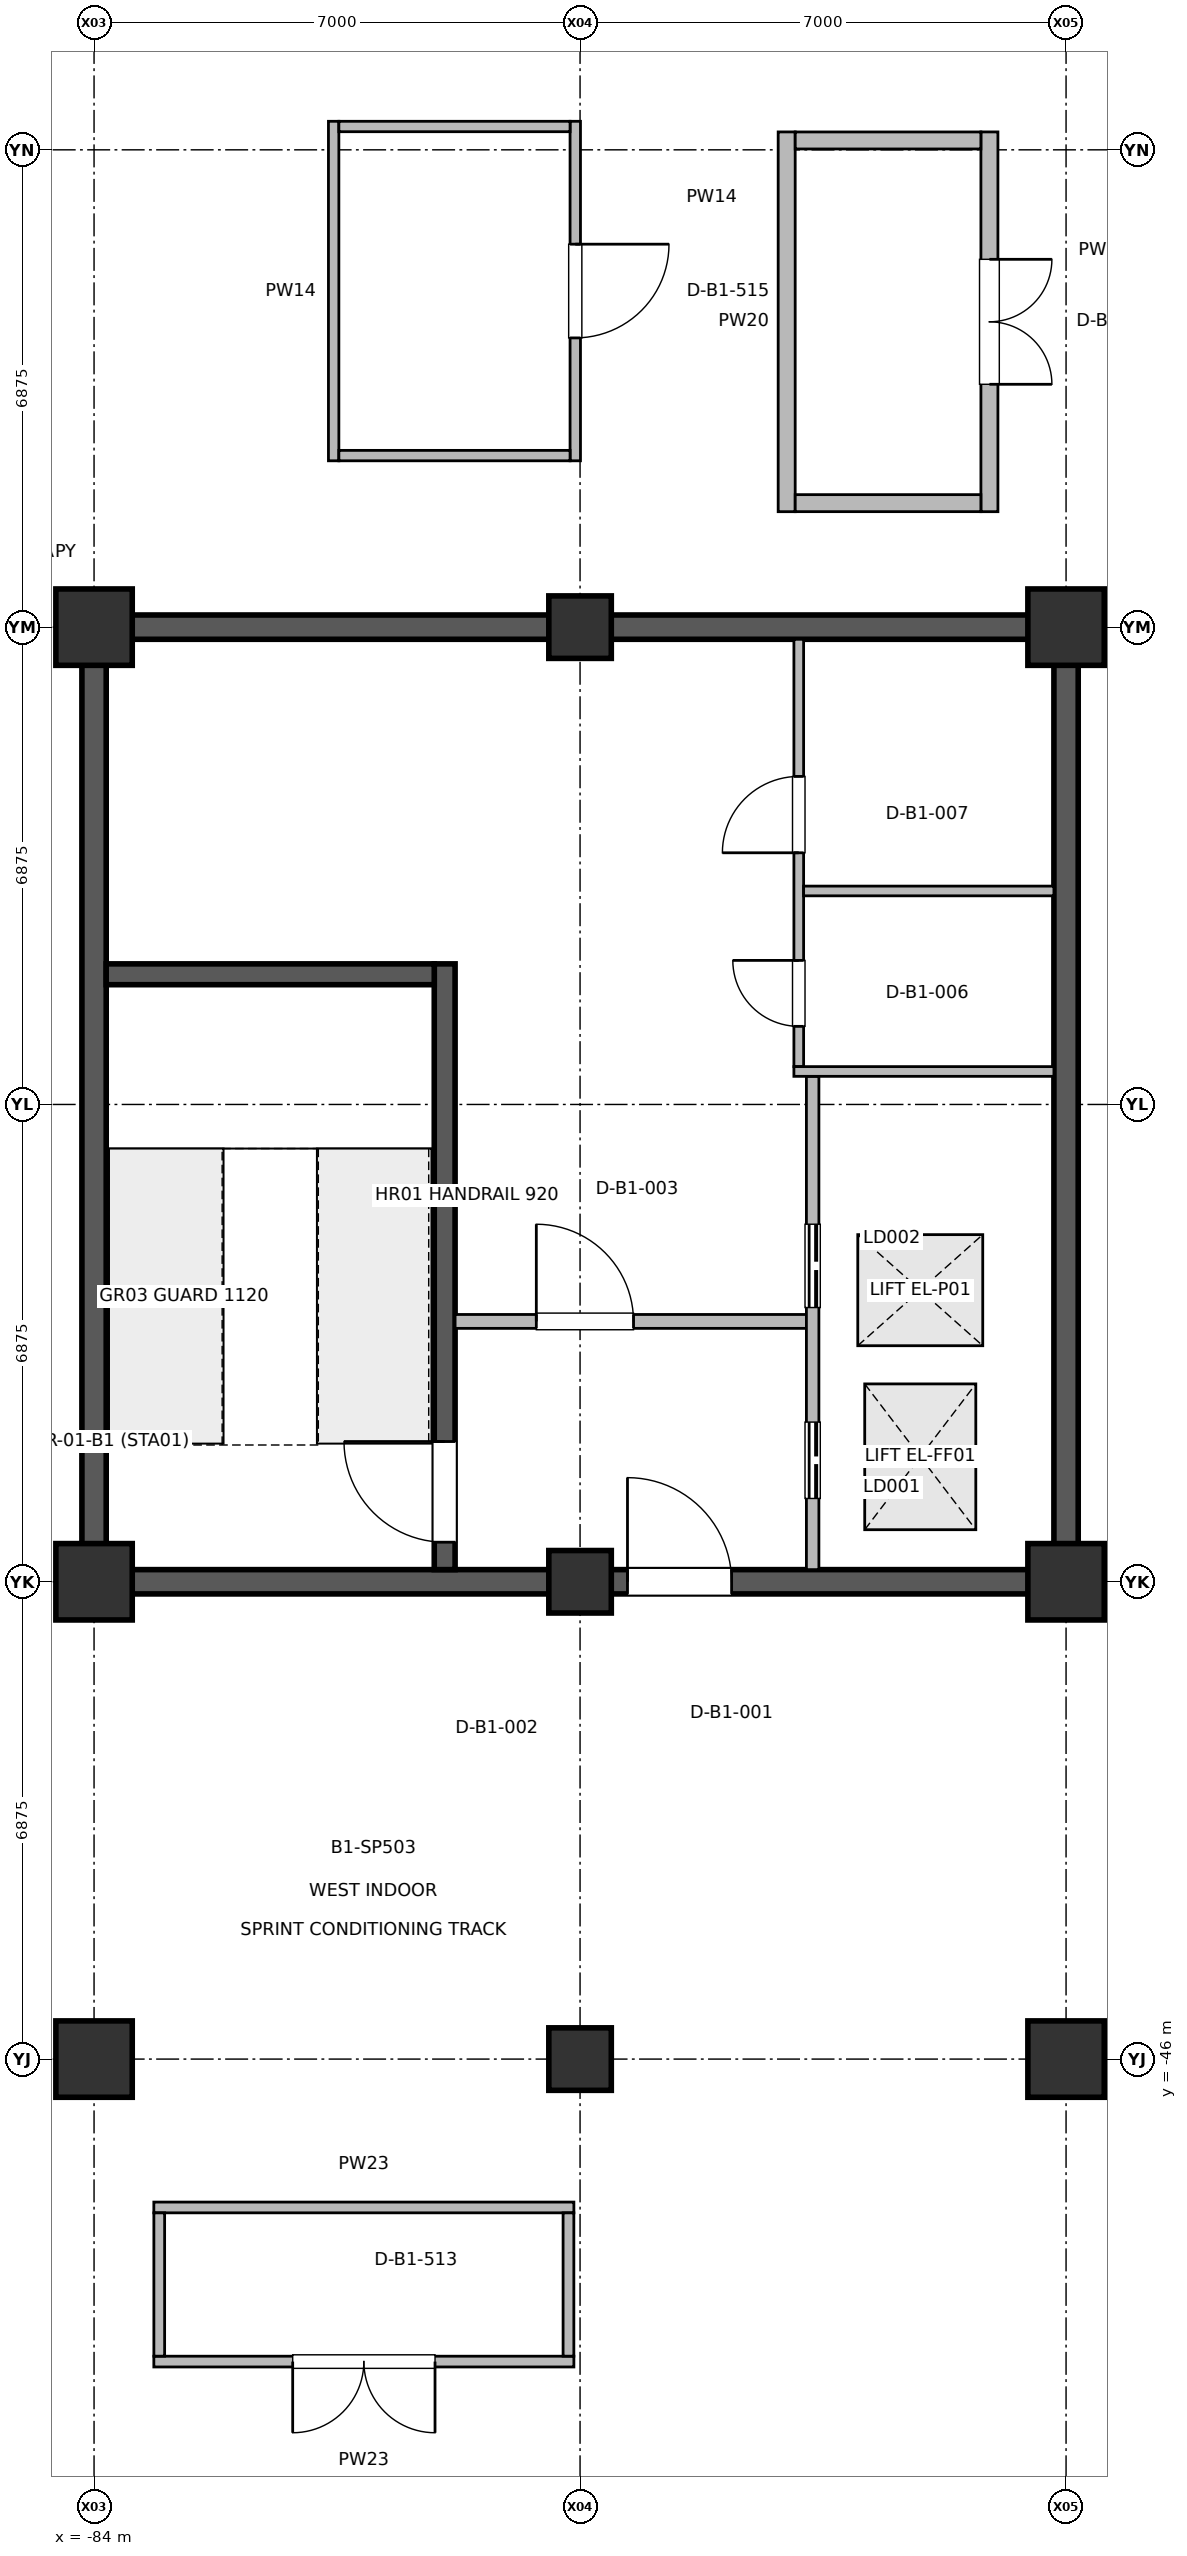
"""IFC4 building model, lengths in metres.
Left out: names, types, materials, properties, quantities, classifications, styles, units other than length and angle.
Written with IfcOpenShell. Run it as: python <this file> out.ifc"""

import sys

from ifc_helpers import new_model, si_unit, direction, frame, frame_2d, origin, origin_2d, place, context, subcontext, project, spatial, rectangle, extrude, element, fill, save


model = new_model("IFC4")
c1 = context("Model", 3, precision=1e-05, world=origin(), true_north=direction((0.0, 1.0)))
c2 = subcontext(c1, "Body", "Model", "MODEL_VIEW")
j1 = project(units=[si_unit("LENGTHUNIT", "METRE"), si_unit("PLANEANGLEUNIT", "RADIAN")], contexts=[c1])
p1 = place(None, origin())
s1 = spatial("IfcSite", under=j1, at=p1, CompositionType="ELEMENT")
p2 = place(p1, origin())
s2 = spatial("IfcBuilding", under=s1, at=p2, CompositionType="ELEMENT")
p3 = place(p2, frame((0.0, 0.0, -6.0)))
s3 = spatial("IfcBuildingStorey", under=s2, at=p3, CompositionType="ELEMENT", Elevation=-6.0)
for number, where, z_axis, x_axis in (
    (1, (-84.0, -46.0, 0.0), (0.0, 0.0, 1.0), (1.0, 0.0, 0.0)),
    (2, (-84.0, -39.125, 0.0), (0.0, 0.0, 1.0), (1.0, 0.0, 0.0)),
    (3, (-84.0, -25.375, 0.0), (0.0, 0.0, 1.0), (1.0, 0.0, 0.0)),
):
    element("IfcColumn", number, at=place(p3, frame(where, z_axis=z_axis, x_axis=x_axis)), inside=s3, PredefinedType="COLUMN", context=c2, shape_type="SweptSolid", body=[
        extrude(rectangle(XDim=1.1, YDim=1.1, at=origin_2d()), origin(), (0.0, 0.0, 1.0), 5.998),
    ])
for number, where, z_axis, x_axis in (
    (4, (-77.0, -46.0, 0.0), (0.0, 0.0, 1.0), (1.0, 0.0, 0.0)),
    (5, (-77.0, -39.125, 0.0), (0.0, 0.0, 1.0), (1.0, 0.0, 0.0)),
    (6, (-77.0, -25.375, 0.0), (0.0, 0.0, 1.0), (1.0, 0.0, 0.0)),
):
    element("IfcColumn", number, at=place(p3, frame(where, z_axis=z_axis, x_axis=x_axis)), inside=s3, PredefinedType="COLUMN", context=c2, shape_type="SweptSolid", body=[
        extrude(rectangle(XDim=0.9, YDim=0.9, at=origin_2d()), origin(), (0.0, 0.0, 1.0), 5.998),
    ])
for number, where, z_axis, x_axis in (
    (7, (-70.0, -46.0, 0.0), (0.0, 0.0, 1.0), (1.0, 0.0, 0.0)),
    (8, (-70.0, -39.125, 0.0), (0.0, 0.0, 1.0), (1.0, 0.0, 0.0)),
    (9, (-70.0, -25.375, 0.0), (0.0, 0.0, 1.0), (1.0, 0.0, 0.0)),
):
    element("IfcColumn", number, at=place(p3, frame(where, z_axis=z_axis, x_axis=x_axis)), inside=s3, PredefinedType="COLUMN", context=c2, shape_type="SweptSolid", body=[
        extrude(rectangle(XDim=1.1, YDim=1.1, at=origin_2d()), origin(), (0.0, 0.0, 1.0), 5.998),
    ])
for number, where, z_axis, x_axis in (
    (10, (-84.0, -38.95, 0.0), (0.0, 0.0, 1.0), (0.0, 1.0, 0.0)),
    (11, (-70.0, -38.95, 0.0), (0.0, 0.0, 1.0), (0.0, 1.0, 0.0)),
):
    element("IfcWall", number, at=place(p3, frame(where, z_axis=z_axis, x_axis=x_axis)), inside=s3, PredefinedType="SHEAR", context=c2, shape_type="SweptSolid", body=[
        extrude(rectangle(XDim=13.4, YDim=0.35, at=frame_2d((6.7, 0.0))), origin(), (0.0, 0.0, 1.0), 5.75),
    ])
p4 = place(p3, frame((-83.825, -39.125, 0.0), z_axis=(0.0, 0.0, 1.0), x_axis=(1.0, 0.0, 0.0)))
e12 = element("IfcWall", 12, at=p4, inside=s3, PredefinedType="SHEAR", context=c2, shape_type="SweptSolid", body=[
    extrude(rectangle(XDim=13.65, YDim=0.35, at=frame_2d((6.825, 0.0))), origin(), (0.0, 0.0, 1.0), 5.75),
])
p5 = place(p4, frame((7.508, 0.0, 0.0)))
e13 = element("IfcOpeningElement", 13, at=p5, cuts=e12, PredefinedType="OPENING", context=c2, shape_type="SweptSolid", body=[
    extrude(rectangle(XDim=1.5, YDim=2.2, at=frame_2d((0.75, 1.1))), frame((0.0, 0.185, 0.0), z_axis=(0.0, -1.0, 0.0), x_axis=(1.0, 0.0, 0.0)), (0.0, 0.0, 1.0), 0.37),
])
p6 = place(p3, frame((-83.825, -25.375, 0.0), z_axis=(0.0, 0.0, 1.0), x_axis=(1.0, 0.0, 0.0)))
e14 = element("IfcWall", 14, at=p6, inside=s3, PredefinedType="SHEAR", context=c2, shape_type="SweptSolid", body=[
    extrude(rectangle(XDim=13.65, YDim=0.35, at=frame_2d((6.825, 0.0))), origin(), (0.0, 0.0, 1.0), 5.75),
])
p7 = place(p3, frame((-78.95, -38.95, 0.0), z_axis=(0.0, 0.0, 1.0), x_axis=(0.0, 1.0, 0.0)))
e15 = element("IfcWall", 15, at=p7, inside=s3, PredefinedType="SHEAR", context=c2, shape_type="SweptSolid", body=[
    extrude(rectangle(XDim=8.725, YDim=0.3, at=frame_2d((4.362, 0.0))), origin(), (0.0, 0.0, 1.0), 5.75),
])
p8 = place(p7, frame((0.395, 0.0, 0.0)))
e16 = element("IfcOpeningElement", 16, at=p8, cuts=e15, PredefinedType="OPENING", context=c2, shape_type="SweptSolid", body=[
    extrude(rectangle(XDim=1.45, YDim=2.2, at=frame_2d((0.725, 1.1))), frame((0.0, 0.16, 0.0), z_axis=(0.0, -1.0, 0.0), x_axis=(1.0, 0.0, 0.0)), (0.0, 0.0, 1.0), 0.32),
])
p9 = place(p3, frame((-78.8, -35.375, 0.0), z_axis=(0.0, 0.0, 1.0), x_axis=(1.0, 0.0, 0.0)))
e17 = element("IfcWall", 17, at=p9, inside=s3, PredefinedType="PARTITIONING", context=c2, shape_type="SweptSolid", body=[
    extrude(rectangle(XDim=5.06, YDim=0.2, at=frame_2d((2.53, 0.0))), origin(), (0.0, 0.0, 1.0), 5.02),
])
p10 = place(p9, frame((1.17, 0.0, 0.0)))
e18 = element("IfcOpeningElement", 18, at=p10, cuts=e17, PredefinedType="OPENING", context=c2, shape_type="SweptSolid", body=[
    extrude(rectangle(XDim=1.4, YDim=2.2, at=frame_2d((0.7, 1.1))), frame((0.0, 0.11, 0.0), z_axis=(0.0, -1.0, 0.0), x_axis=(1.0, 0.0, 0.0)), (0.0, 0.0, 1.0), 0.22),
])
p11 = place(p3, frame((-73.65, -38.95, 0.0), z_axis=(0.0, 0.0, 1.0), x_axis=(0.0, 1.0, 0.0)))
e19 = element("IfcWall", 19, at=p11, inside=s3, PredefinedType="PARTITIONING", context=c2, shape_type="SweptSolid", body=[
    extrude(rectangle(XDim=7.105, YDim=0.18, at=frame_2d((3.552, 0.0))), origin(), (0.0, 0.0, 1.0), 5.02),
])
p12 = place(p11, frame((1.025, 0.0, 0.0)))
e20 = element("IfcOpeningElement", 20, at=p12, cuts=e19, PredefinedType="OPENING", context=c2, shape_type="SweptSolid", body=[
    extrude(rectangle(XDim=1.1, YDim=2.2, at=frame_2d((0.55, 1.1))), frame((0.0, 0.1, 0.0), z_axis=(0.0, -1.0, 0.0), x_axis=(1.0, 0.0, 0.0)), (0.0, 0.0, 1.0), 0.2),
])
p13 = place(p11, frame((3.775, 0.0, 0.0)))
e21 = element("IfcOpeningElement", 21, at=p13, cuts=e19, PredefinedType="OPENING", context=c2, shape_type="SweptSolid", body=[
    extrude(rectangle(XDim=1.2, YDim=2.25, at=frame_2d((0.6, 1.125))), frame((0.0, 0.1, 0.0), z_axis=(0.0, -1.0, 0.0), x_axis=(1.0, 0.0, 0.0)), (0.0, 0.0, 1.0), 0.2),
])
p14 = place(p3, frame((-73.85, -31.705, 0.0), z_axis=(0.0, 0.0, 1.0), x_axis=(0.0, 1.0, 0.0)))
e22 = element("IfcWall", 22, at=p14, inside=s3, PredefinedType="PARTITIONING", context=c2, shape_type="SweptSolid", body=[
    extrude(rectangle(XDim=6.155, YDim=0.14, at=frame_2d((3.078, 0.0))), origin(), (0.0, 0.0, 1.0), 5.02),
])
p15 = place(p14, frame((0.58, 0.0, 0.0)))
e23 = element("IfcOpeningElement", 23, at=p15, cuts=e22, PredefinedType="OPENING", context=c2, shape_type="SweptSolid", body=[
    extrude(rectangle(XDim=0.95, YDim=2.15, at=frame_2d((0.475, 1.075))), frame((0.0, 0.08, 0.0), z_axis=(0.0, -1.0, 0.0), x_axis=(1.0, 0.0, 0.0)), (0.0, 0.0, 1.0), 0.16),
])
p16 = place(p14, frame((3.08, 0.0, 0.0)))
e24 = element("IfcOpeningElement", 24, at=p16, cuts=e22, PredefinedType="OPENING", context=c2, shape_type="SweptSolid", body=[
    extrude(rectangle(XDim=1.1, YDim=2.15, at=frame_2d((0.55, 1.075))), frame((0.0, 0.08, 0.0), z_axis=(0.0, -1.0, 0.0), x_axis=(1.0, 0.0, 0.0)), (0.0, 0.0, 1.0), 0.16),
])
p17 = place(p3, frame((-71.104, -18.242, 0.0), z_axis=(0.0, 0.0, 1.0), x_axis=(0.0, -1.0, 0.0)))
e25 = element("IfcWall", 25, at=p17, inside=s3, PredefinedType="PARTITIONING", context=c2, shape_type="SweptSolid", body=[
    extrude(rectangle(XDim=5.47, YDim=0.245, at=frame_2d((2.735, 0.0))), origin(), (0.0, 0.0, 1.0), 5.02),
])
p18 = place(p17, frame((1.835, 0.0, 0.0)))
e26 = element("IfcOpeningElement", 26, at=p18, cuts=e25, PredefinedType="OPENING", context=c2, shape_type="SweptSolid", body=[
    extrude(rectangle(XDim=1.8, YDim=2.3, at=frame_2d((0.9, 1.15))), frame((0.0, 0.133, 0.0), z_axis=(0.0, -1.0, 0.0), x_axis=(1.0, 0.0, 0.0)), (0.0, 0.0, 1.0), 0.265),
])
p19 = place(p3, frame((-77.089, -50.357, 0.0), z_axis=(0.0, 0.0, 1.0), x_axis=(-1.0, 0.0, 0.0)))
e27 = element("IfcWall", 27, at=p19, inside=s3, PredefinedType="PARTITIONING", context=c2, shape_type="SweptSolid", body=[
    extrude(rectangle(XDim=6.05, YDim=0.155, at=frame_2d((3.025, 0.0))), origin(), (0.0, 0.0, 1.0), 5.02),
])
p20 = place(p19, frame((2.0, 0.0, 0.0)))
e28 = element("IfcOpeningElement", 28, at=p20, cuts=e27, PredefinedType="OPENING", context=c2, shape_type="SweptSolid", body=[
    extrude(rectangle(XDim=2.05, YDim=2.4, at=frame_2d((1.025, 1.2))), frame((0.0, 0.087, 0.0), z_axis=(0.0, -1.0, 0.0), x_axis=(1.0, 0.0, 0.0)), (0.0, 0.0, 1.0), 0.175),
])
p21 = place(p3, frame((-77.069, -18.089, 0.0), z_axis=(0.0, 0.0, 1.0), x_axis=(0.0, -1.0, 0.0)))
e29 = element("IfcWall", 29, at=p21, inside=s3, PredefinedType="PARTITIONING", context=c2, shape_type="SweptSolid", body=[
    extrude(rectangle(XDim=4.89, YDim=0.15, at=frame_2d((2.445, 0.0))), origin(), (0.0, 0.0, 1.0), 5.02),
])
p22 = place(p21, frame((1.77, 0.0, 0.0)))
e30 = element("IfcOpeningElement", 30, at=p22, cuts=e29, PredefinedType="OPENING", context=c2, shape_type="SweptSolid", body=[
    extrude(rectangle(XDim=1.35, YDim=2.2, at=frame_2d((0.675, 1.1))), frame((0.0, 0.085, 0.0), z_axis=(0.0, -1.0, 0.0), x_axis=(1.0, 0.0, 0.0)), (0.0, 0.0, 1.0), 0.17),
])
p23 = place(p3, frame((-73.92, -31.775, 0.0), z_axis=(0.0, 0.0, 1.0), x_axis=(1.0, 0.0, 0.0)))
e31 = element("IfcWall", 31, at=p23, inside=s3, PredefinedType="PARTITIONING", context=c2, shape_type="SweptSolid", body=[
    extrude(rectangle(XDim=3.745, YDim=0.14, at=frame_2d((1.873, 0.0))), origin(), (0.0, 0.0, 1.0), 5.02),
])
p24 = place(p3, frame((-73.78, -29.175, 0.0), z_axis=(0.0, 0.0, 1.0), x_axis=(1.0, 0.0, 0.0)))
e32 = element("IfcWall", 32, at=p24, inside=s3, PredefinedType="PARTITIONING", context=c2, shape_type="SweptSolid", body=[
    extrude(rectangle(XDim=3.605, YDim=0.14, at=frame_2d((1.802, 0.0))), origin(), (0.0, 0.0, 1.0), 5.02),
])
p25 = place(p3, frame((-74.024, -23.712, 0.0), z_axis=(0.0, 0.0, 1.0), x_axis=(0.0, 1.0, 0.0)))
e33 = element("IfcWall", 33, at=p25, inside=s3, PredefinedType="PARTITIONING", context=c2, shape_type="SweptSolid", body=[
    extrude(rectangle(XDim=5.47, YDim=0.245, at=frame_2d((2.735, 0.0))), origin(), (0.0, 0.0, 1.0), 5.02),
])
for number, where, z_axis, x_axis in (
    (34, (-73.901, -23.589, 0.0), (0.0, 0.0, 1.0), (1.0, 0.0, 0.0)),
    (35, (-73.901, -18.365, 0.0), (0.0, 0.0, 1.0), (1.0, 0.0, 0.0)),
):
    element("IfcWall", number, at=place(p3, frame(where, z_axis=z_axis, x_axis=x_axis)), inside=s3, PredefinedType="PARTITIONING", context=c2, shape_type="SweptSolid", body=[
        extrude(rectangle(XDim=2.674, YDim=0.245, at=frame_2d((1.337, 0.0))), origin(), (0.0, 0.0, 1.0), 5.02),
    ])
p26 = place(p3, frame((-83.139, -48.137, 0.0), z_axis=(0.0, 0.0, 1.0), x_axis=(1.0, 0.0, 0.0)))
e36 = element("IfcWall", 36, at=p26, inside=s3, PredefinedType="PARTITIONING", context=c2, shape_type="SweptSolid", body=[
    extrude(rectangle(XDim=6.05, YDim=0.155, at=frame_2d((3.025, 0.0))), origin(), (0.0, 0.0, 1.0), 5.02),
])
for number, where, z_axis, x_axis in (
    (37, (-83.061, -50.279, 0.0), (0.0, 0.0, 1.0), (0.0, 1.0, 0.0)),
    (38, (-77.167, -50.279, 0.0), (0.0, 0.0, 1.0), (0.0, 1.0, 0.0)),
):
    element("IfcWall", number, at=place(p3, frame(where, z_axis=z_axis, x_axis=x_axis)), inside=s3, PredefinedType="PARTITIONING", context=c2, shape_type="SweptSolid", body=[
        extrude(rectangle(XDim=2.064, YDim=0.155, at=frame_2d((1.032, 0.0))), origin(), (0.0, 0.0, 1.0), 5.02),
    ])
p27 = place(p3, frame((-80.549, -22.979, 0.0), z_axis=(0.0, 0.0, 1.0), x_axis=(0.0, 1.0, 0.0)))
e39 = element("IfcWall", 39, at=p27, inside=s3, PredefinedType="PARTITIONING", context=c2, shape_type="SweptSolid", body=[
    extrude(rectangle(XDim=4.89, YDim=0.15, at=frame_2d((2.445, 0.0))), origin(), (0.0, 0.0, 1.0), 5.02),
])
for number, where, z_axis, x_axis in (
    (40, (-80.474, -22.904, 0.0), (0.0, 0.0, 1.0), (1.0, 0.0, 0.0)),
    (41, (-80.474, -18.164, 0.0), (0.0, 0.0, 1.0), (1.0, 0.0, 0.0)),
):
    element("IfcWall", number, at=place(p3, frame(where, z_axis=z_axis, x_axis=x_axis)), inside=s3, PredefinedType="PARTITIONING", context=c2, shape_type="SweptSolid", body=[
        extrude(rectangle(XDim=3.33, YDim=0.15, at=frame_2d((1.665, 0.0))), origin(), (0.0, 0.0, 1.0), 5.02),
    ])
p28 = place(p3, frame((-83.825, -30.375, 0.0), z_axis=(0.0, 0.0, 1.0), x_axis=(1.0, 0.0, 0.0)))
e42 = element("IfcWall", 42, at=p28, inside=s3, PredefinedType="SHEAR", context=c2, shape_type="SweptSolid", body=[
    extrude(rectangle(XDim=4.725, YDim=0.3, at=frame_2d((2.362, 0.0))), origin(), (0.0, 0.0, 1.0), 5.75),
])
p29 = place(p5, origin())
e43 = element("IfcDoor", 43, at=p29, inside=s3, OperationType="SINGLE_SWING_LEFT", PredefinedType="DOOR", context=c2, shape_type="SweptSolid", body=[
    extrude(rectangle(XDim=1.5, YDim=2.2, at=frame_2d((0.75, 1.1))), frame((0.0, 0.025, 0.0), z_axis=(0.0, -1.0, 0.0), x_axis=(1.0, 0.0, 0.0)), (0.0, 0.0, 1.0), 0.05),
])
fill(e13, e43)
p30 = place(p8, origin())
e44 = element("IfcDoor", 44, at=p30, inside=s3, OperationType="SINGLE_SWING_RIGHT", PredefinedType="DOOR", context=c2, shape_type="SweptSolid", body=[
    extrude(rectangle(XDim=1.45, YDim=2.2, at=frame_2d((0.725, 1.1))), frame((0.0, 0.025, 0.0), z_axis=(0.0, -1.0, 0.0), x_axis=(1.0, 0.0, 0.0)), (0.0, 0.0, 1.0), 0.05),
])
fill(e16, e44)
p31 = place(p10, origin())
e45 = element("IfcDoor", 45, at=p31, inside=s3, OperationType="SINGLE_SWING_LEFT", PredefinedType="DOOR", context=c2, shape_type="SweptSolid", body=[
    extrude(rectangle(XDim=1.4, YDim=2.2, at=frame_2d((0.7, 1.1))), frame((0.0, 0.025, 0.0), z_axis=(0.0, -1.0, 0.0), x_axis=(1.0, 0.0, 0.0)), (0.0, 0.0, 1.0), 0.05),
])
fill(e18, e45)
p32 = place(p12, origin())
e46 = element("IfcDoor", 46, at=p32, inside=s3, OperationType="DOUBLE_DOOR_SLIDING", PredefinedType="DOOR", context=c2, shape_type="SweptSolid", body=[
    extrude(rectangle(XDim=1.1, YDim=2.2, at=frame_2d((0.55, 1.1))), frame((0.0, 0.025, 0.0), z_axis=(0.0, -1.0, 0.0), x_axis=(1.0, 0.0, 0.0)), (0.0, 0.0, 1.0), 0.05),
])
fill(e20, e46)
p33 = place(p13, origin())
e47 = element("IfcDoor", 47, at=p33, inside=s3, OperationType="DOUBLE_DOOR_SLIDING", PredefinedType="DOOR", context=c2, shape_type="SweptSolid", body=[
    extrude(rectangle(XDim=1.2, YDim=2.25, at=frame_2d((0.6, 1.125))), frame((0.0, 0.025, 0.0), z_axis=(0.0, -1.0, 0.0), x_axis=(1.0, 0.0, 0.0)), (0.0, 0.0, 1.0), 0.05),
])
fill(e21, e47)
p34 = place(p15, origin())
e48 = element("IfcDoor", 48, at=p34, inside=s3, OperationType="SINGLE_SWING_RIGHT", PredefinedType="DOOR", context=c2, shape_type="SweptSolid", body=[
    extrude(rectangle(XDim=0.95, YDim=2.15, at=frame_2d((0.475, 1.075))), frame((0.0, 0.025, 0.0), z_axis=(0.0, -1.0, 0.0), x_axis=(1.0, 0.0, 0.0)), (0.0, 0.0, 1.0), 0.05),
])
fill(e23, e48)
p35 = place(p16, origin())
e49 = element("IfcDoor", 49, at=p35, inside=s3, OperationType="SINGLE_SWING_LEFT", PredefinedType="DOOR", context=c2, shape_type="SweptSolid", body=[
    extrude(rectangle(XDim=1.1, YDim=2.15, at=frame_2d((0.55, 1.075))), frame((0.0, 0.025, 0.0), z_axis=(0.0, -1.0, 0.0), x_axis=(1.0, 0.0, 0.0)), (0.0, 0.0, 1.0), 0.05),
])
fill(e24, e49)
p36 = place(p18, origin())
e50 = element("IfcDoor", 50, at=p36, inside=s3, OperationType="DOUBLE_DOOR_SINGLE_SWING", PredefinedType="DOOR", context=c2, shape_type="SweptSolid", body=[
    extrude(rectangle(XDim=1.8, YDim=2.3, at=frame_2d((0.9, 1.15))), frame((0.0, 0.025, 0.0), z_axis=(0.0, -1.0, 0.0), x_axis=(1.0, 0.0, 0.0)), (0.0, 0.0, 1.0), 0.05),
])
fill(e26, e50)
p37 = place(p20, origin())
e51 = element("IfcDoor", 51, at=p37, inside=s3, OperationType="DOUBLE_DOOR_SINGLE_SWING", PredefinedType="DOOR", context=c2, shape_type="SweptSolid", body=[
    extrude(rectangle(XDim=2.05, YDim=2.4, at=frame_2d((1.025, 1.2))), frame((0.0, 0.025, 0.0), z_axis=(0.0, -1.0, 0.0), x_axis=(1.0, 0.0, 0.0)), (0.0, 0.0, 1.0), 0.05),
])
fill(e28, e51)
p38 = place(p22, origin())
e52 = element("IfcDoor", 52, at=p38, inside=s3, OperationType="SINGLE_SWING_LEFT", PredefinedType="DOOR", context=c2, shape_type="SweptSolid", body=[
    extrude(rectangle(XDim=1.35, YDim=2.2, at=frame_2d((0.675, 1.1))), frame((0.0, 0.025, 0.0), z_axis=(0.0, -1.0, 0.0), x_axis=(1.0, 0.0, 0.0)), (0.0, 0.0, 1.0), 0.05),
])
fill(e30, e52)
save(model, sys.argv[1])
